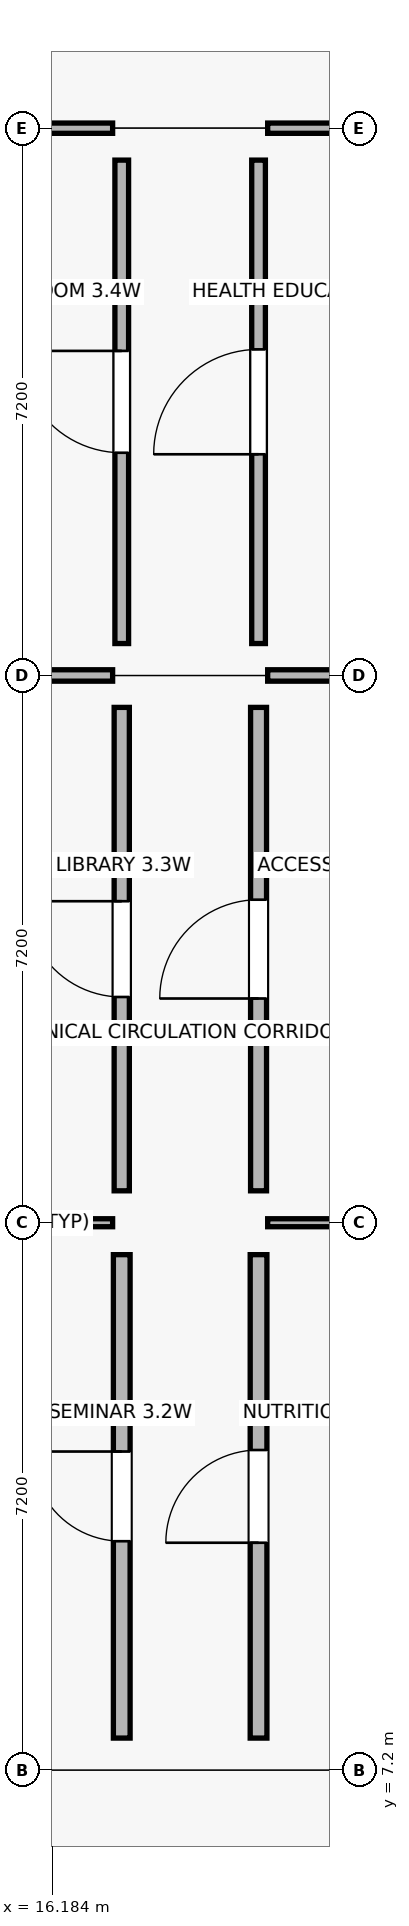
"""IFC4 building model, lengths in metres.
Left out: names, types, materials, properties, quantities, classifications, styles, units other than length and angle.
Written with IfcOpenShell. Run it as: python <this file> out.ifc"""

import sys

from ifc_helpers import new_model, si_unit, direction, frame, frame_2d, origin, place, context, subcontext, project, spatial, rectangle, extrude, element, fill, save


model = new_model("IFC4")
c1 = context("Model", 3, precision=1e-05, world=origin(), true_north=direction((0.0, 1.0)))
c2 = subcontext(c1, "Body", "Model", "MODEL_VIEW")
j1 = project(units=[si_unit("LENGTHUNIT", "METRE"), si_unit("PLANEANGLEUNIT", "RADIAN")], contexts=[c1])
p1 = place(None, origin())
s1 = spatial("IfcSite", under=j1, at=p1, CompositionType="ELEMENT")
p2 = place(p1, origin())
s2 = spatial("IfcBuilding", under=s1, at=p2, CompositionType="ELEMENT")
p3 = place(p2, frame((0.0, 0.0, 4.5)))
s3 = spatial("IfcBuildingStorey", under=s2, at=p3, CompositionType="ELEMENT", Elevation=4.5)
p4 = place(p3, frame((17.1, 7.62, 0.0), z_axis=(0.0, 0.0, 1.0), x_axis=(0.0, 1.0, 0.0)))
e1 = element("IfcWall", 1, at=p4, inside=s3, PredefinedType="SOLIDWALL", context=c2, shape_type="SweptSolid", body=[
    extrude(rectangle(XDim=6.36, YDim=0.22, at=frame_2d((3.18, 0.0))), origin(), (0.0, 0.0, 1.0), 3.36),
])
p5 = place(p4, frame((2.59, 0.0, 0.0)))
e2 = element("IfcOpeningElement", 2, at=p5, cuts=e1, PredefinedType="OPENING", context=c2, shape_type="SweptSolid", body=[
    extrude(rectangle(XDim=1.18, YDim=2.09, at=frame_2d((0.59, 1.045))), frame((0.0, 0.12, 0.0), z_axis=(0.0, -1.0, 0.0), x_axis=(1.0, 0.0, 0.0)), (0.0, 0.0, 1.0), 0.24),
])
p6 = place(p3, frame((14.82, 14.4, 0.0), z_axis=(0.0, 0.0, 1.0), x_axis=(1.0, 0.0, 0.0)))
e3 = element("IfcWall", 3, at=p6, inside=s3, PredefinedType="PARTITIONING", context=c2, shape_type="SweptSolid", body=[
    extrude(rectangle(XDim=2.16, YDim=0.105, at=frame_2d((1.08, 0.0))), origin(), (0.0, 0.0, 1.0), 3.36),
])
p7 = place(p3, frame((18.9, 7.62, 0.0), z_axis=(0.0, 0.0, 1.0), x_axis=(0.0, 1.0, 0.0)))
e4 = element("IfcWall", 4, at=p7, inside=s3, PredefinedType="SOLIDWALL", context=c2, shape_type="SweptSolid", body=[
    extrude(rectangle(XDim=6.36, YDim=0.22, at=frame_2d((3.18, 0.0))), origin(), (0.0, 0.0, 1.0), 3.36),
])
p8 = place(p7, frame((2.57, 0.0, 0.0)))
e5 = element("IfcOpeningElement", 5, at=p8, cuts=e4, PredefinedType="OPENING", context=c2, shape_type="SweptSolid", body=[
    extrude(rectangle(XDim=1.22, YDim=2.09, at=frame_2d((0.61, 1.045))), frame((0.0, 0.12, 0.0), z_axis=(0.0, -1.0, 0.0), x_axis=(1.0, 0.0, 0.0)), (0.0, 0.0, 1.0), 0.24),
])
p9 = place(p3, frame((19.02, 14.4, 0.0), z_axis=(0.0, 0.0, 1.0), x_axis=(1.0, 0.0, 0.0)))
e6 = element("IfcWall", 6, at=p9, inside=s3, PredefinedType="PARTITIONING", context=c2, shape_type="SweptSolid", body=[
    extrude(rectangle(XDim=2.16, YDim=0.105, at=frame_2d((1.08, 0.0))), origin(), (0.0, 0.0, 1.0), 3.36),
])
p10 = place(p3, frame((17.1, 14.82, 0.0), z_axis=(0.0, 0.0, 1.0), x_axis=(0.0, 1.0, 0.0)))
e7 = element("IfcWall", 7, at=p10, inside=s3, PredefinedType="SOLIDWALL", context=c2, shape_type="SweptSolid", body=[
    extrude(rectangle(XDim=6.36, YDim=0.2, at=frame_2d((3.18, 0.0))), origin(), (0.0, 0.0, 1.0), 3.36),
])
p11 = place(p10, frame((2.55, 0.0, 0.0)))
e8 = element("IfcOpeningElement", 8, at=p11, cuts=e7, PredefinedType="OPENING", context=c2, shape_type="SweptSolid", body=[
    extrude(rectangle(XDim=1.26, YDim=2.09, at=frame_2d((0.63, 1.045))), frame((0.0, 0.11, 0.0), z_axis=(0.0, -1.0, 0.0), x_axis=(1.0, 0.0, 0.0)), (0.0, 0.0, 1.0), 0.22),
])
p12 = place(p3, frame((14.82, 21.6, 0.0), z_axis=(0.0, 0.0, 1.0), x_axis=(1.0, 0.0, 0.0)))
e9 = element("IfcWall", 9, at=p12, inside=s3, PredefinedType="PARTITIONING", context=c2, shape_type="SweptSolid", body=[
    extrude(rectangle(XDim=2.16, YDim=0.15, at=frame_2d((1.08, 0.0))), origin(), (0.0, 0.0, 1.0), 3.36),
])
p13 = place(p3, frame((18.9, 14.82, 0.0), z_axis=(0.0, 0.0, 1.0), x_axis=(0.0, 1.0, 0.0)))
e10 = element("IfcWall", 10, at=p13, inside=s3, PredefinedType="PLUMBINGWALL", context=c2, shape_type="SweptSolid", body=[
    extrude(rectangle(XDim=6.36, YDim=0.21, at=frame_2d((3.18, 0.0))), origin(), (0.0, 0.0, 1.0), 3.36),
])
p14 = place(p13, frame((2.53, 0.0, 0.0)))
e11 = element("IfcOpeningElement", 11, at=p14, cuts=e10, PredefinedType="OPENING", context=c2, shape_type="SweptSolid", body=[
    extrude(rectangle(XDim=1.3, YDim=2.09, at=frame_2d((0.65, 1.045))), frame((0.0, 0.115, 0.0), z_axis=(0.0, -1.0, 0.0), x_axis=(1.0, 0.0, 0.0)), (0.0, 0.0, 1.0), 0.23),
])
p15 = place(p3, frame((19.02, 21.6, 0.0), z_axis=(0.0, 0.0, 1.0), x_axis=(1.0, 0.0, 0.0)))
e12 = element("IfcWall", 12, at=p15, inside=s3, PredefinedType="PARTITIONING", context=c2, shape_type="SweptSolid", body=[
    extrude(rectangle(XDim=2.16, YDim=0.15, at=frame_2d((1.08, 0.0))), origin(), (0.0, 0.0, 1.0), 3.36),
])
p16 = place(p3, frame((17.1, 22.02, 0.0), z_axis=(0.0, 0.0, 1.0), x_axis=(0.0, 1.0, 0.0)))
e13 = element("IfcWall", 13, at=p16, inside=s3, PredefinedType="PARTITIONING", context=c2, shape_type="SweptSolid", body=[
    extrude(rectangle(XDim=6.36, YDim=0.18, at=frame_2d((3.18, 0.0))), origin(), (0.0, 0.0, 1.0), 3.36),
])
p17 = place(p16, frame((2.51, 0.0, 0.0)))
e14 = element("IfcOpeningElement", 14, at=p17, cuts=e13, PredefinedType="OPENING", context=c2, shape_type="SweptSolid", body=[
    extrude(rectangle(XDim=1.34, YDim=2.09, at=frame_2d((0.67, 1.045))), frame((0.0, 0.1, 0.0), z_axis=(0.0, -1.0, 0.0), x_axis=(1.0, 0.0, 0.0)), (0.0, 0.0, 1.0), 0.2),
])
p18 = place(p3, frame((14.82, 28.8, 0.0), z_axis=(0.0, 0.0, 1.0), x_axis=(1.0, 0.0, 0.0)))
e15 = element("IfcWall", 15, at=p18, inside=s3, PredefinedType="PARTITIONING", context=c2, shape_type="SweptSolid", body=[
    extrude(rectangle(XDim=2.16, YDim=0.135, at=frame_2d((1.08, 0.0))), origin(), (0.0, 0.0, 1.0), 3.36),
])
p19 = place(p3, frame((18.9, 22.02, 0.0), z_axis=(0.0, 0.0, 1.0), x_axis=(0.0, 1.0, 0.0)))
e16 = element("IfcWall", 16, at=p19, inside=s3, PredefinedType="PARTITIONING", context=c2, shape_type="SweptSolid", body=[
    extrude(rectangle(XDim=6.36, YDim=0.18, at=frame_2d((3.18, 0.0))), origin(), (0.0, 0.0, 1.0), 3.36),
])
p20 = place(p19, frame((2.49, 0.0, 0.0)))
e17 = element("IfcOpeningElement", 17, at=p20, cuts=e16, PredefinedType="OPENING", context=c2, shape_type="SweptSolid", body=[
    extrude(rectangle(XDim=1.38, YDim=2.09, at=frame_2d((0.69, 1.045))), frame((0.0, 0.1, 0.0), z_axis=(0.0, -1.0, 0.0), x_axis=(1.0, 0.0, 0.0)), (0.0, 0.0, 1.0), 0.2),
])
p21 = place(p3, frame((19.02, 28.8, 0.0), z_axis=(0.0, 0.0, 1.0), x_axis=(1.0, 0.0, 0.0)))
e18 = element("IfcWall", 18, at=p21, inside=s3, PredefinedType="PARTITIONING", context=c2, shape_type="SweptSolid", body=[
    extrude(rectangle(XDim=2.16, YDim=0.135, at=frame_2d((1.08, 0.0))), origin(), (0.0, 0.0, 1.0), 3.36),
])
p22 = place(p5, origin())
e19 = element("IfcDoor", 19, at=p22, inside=s3, OperationType="SINGLE_SWING_RIGHT", PredefinedType="DOOR", context=c2, shape_type="SweptSolid", body=[
    extrude(rectangle(XDim=1.18, YDim=2.09, at=frame_2d((0.59, 1.045))), frame((0.0, 0.025, 0.0), z_axis=(0.0, -1.0, 0.0), x_axis=(1.0, 0.0, 0.0)), (0.0, 0.0, 1.0), 0.05),
])
fill(e2, e19)
p23 = place(p8, origin())
e20 = element("IfcDoor", 20, at=p23, inside=s3, OperationType="SINGLE_SWING_LEFT", PredefinedType="DOOR", context=c2, shape_type="SweptSolid", body=[
    extrude(rectangle(XDim=1.22, YDim=2.09, at=frame_2d((0.61, 1.045))), frame((0.0, 0.025, 0.0), z_axis=(0.0, -1.0, 0.0), x_axis=(1.0, 0.0, 0.0)), (0.0, 0.0, 1.0), 0.05),
])
fill(e5, e20)
p24 = place(p11, origin())
e21 = element("IfcDoor", 21, at=p24, inside=s3, OperationType="SINGLE_SWING_RIGHT", PredefinedType="DOOR", context=c2, shape_type="SweptSolid", body=[
    extrude(rectangle(XDim=1.26, YDim=2.09, at=frame_2d((0.63, 1.045))), frame((0.0, 0.025, 0.0), z_axis=(0.0, -1.0, 0.0), x_axis=(1.0, 0.0, 0.0)), (0.0, 0.0, 1.0), 0.05),
])
fill(e8, e21)
p25 = place(p14, origin())
e22 = element("IfcDoor", 22, at=p25, inside=s3, OperationType="SINGLE_SWING_LEFT", PredefinedType="DOOR", context=c2, shape_type="SweptSolid", body=[
    extrude(rectangle(XDim=1.3, YDim=2.09, at=frame_2d((0.65, 1.045))), frame((0.0, 0.025, 0.0), z_axis=(0.0, -1.0, 0.0), x_axis=(1.0, 0.0, 0.0)), (0.0, 0.0, 1.0), 0.05),
])
fill(e11, e22)
p26 = place(p17, origin())
e23 = element("IfcDoor", 23, at=p26, inside=s3, OperationType="SINGLE_SWING_RIGHT", PredefinedType="DOOR", context=c2, shape_type="SweptSolid", body=[
    extrude(rectangle(XDim=1.34, YDim=2.09, at=frame_2d((0.67, 1.045))), frame((0.0, 0.025, 0.0), z_axis=(0.0, -1.0, 0.0), x_axis=(1.0, 0.0, 0.0)), (0.0, 0.0, 1.0), 0.05),
])
fill(e14, e23)
p27 = place(p20, origin())
e24 = element("IfcDoor", 24, at=p27, inside=s3, OperationType="SINGLE_SWING_LEFT", PredefinedType="DOOR", context=c2, shape_type="SweptSolid", body=[
    extrude(rectangle(XDim=1.38, YDim=2.09, at=frame_2d((0.69, 1.045))), frame((0.0, 0.025, 0.0), z_axis=(0.0, -1.0, 0.0), x_axis=(1.0, 0.0, 0.0)), (0.0, 0.0, 1.0), 0.05),
])
fill(e17, e24)
save(model, sys.argv[1])
